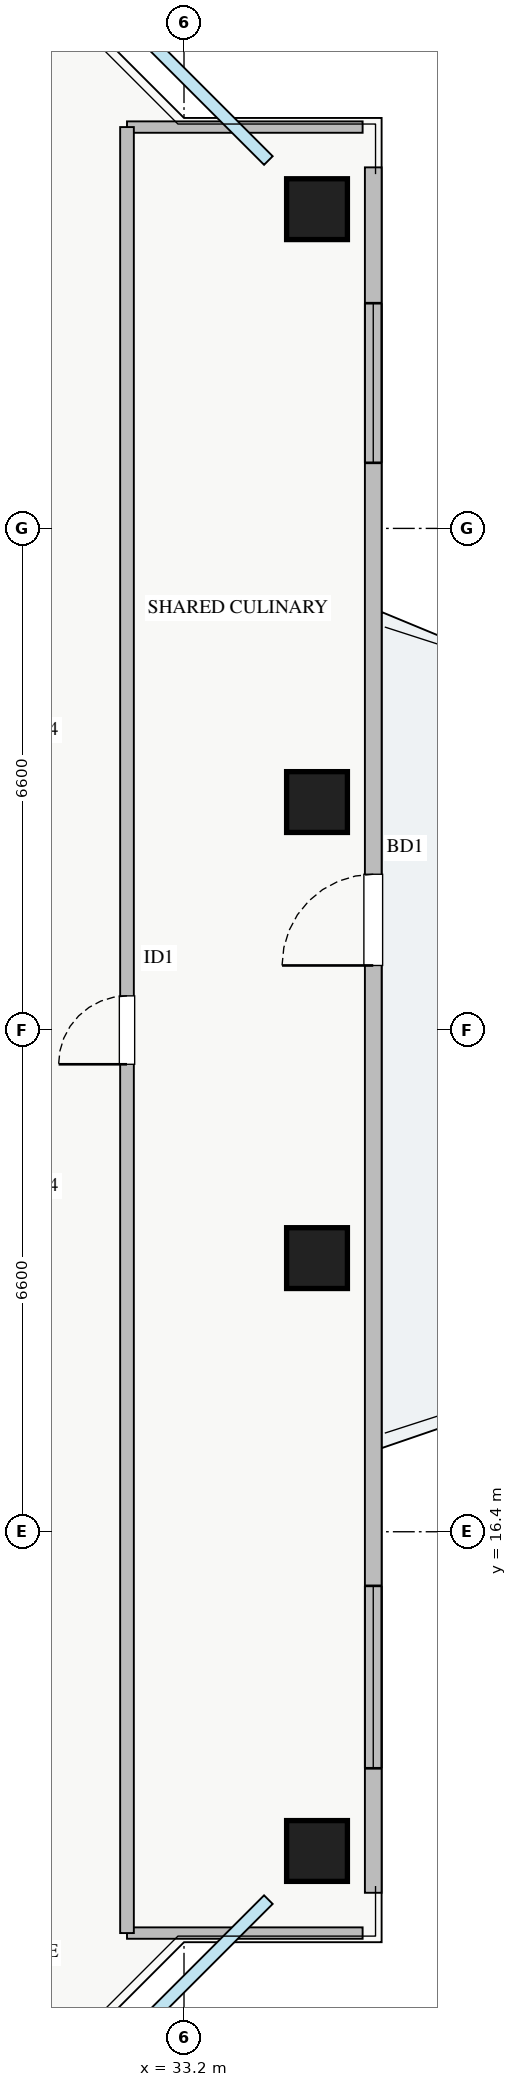
"""IFC4 building model, lengths in metres.
Left out: names, types, materials, properties, quantities, classifications, styles, units other than length and angle.
Written with IfcOpenShell. Run it as: python <this file> out.ifc"""

import sys

from ifc_helpers import new_model, si_unit, direction, frame, frame_2d, origin, origin_2d, place, context, subcontext, project, spatial, rectangle, extrude, source, transform, mapped, element, fill, save


model = new_model("IFC4")
c1 = context("Model", 3, precision=1e-05, world=origin(), true_north=direction((0.0, 1.0)))
c2 = subcontext(c1, "Body", "Model", "MODEL_VIEW")
j1 = project(units=[si_unit("LENGTHUNIT", "METRE"), si_unit("PLANEANGLEUNIT", "RADIAN")], contexts=[c1])
p1 = place(None, origin())
s1 = spatial("IfcSite", under=j1, at=p1, CompositionType="ELEMENT")
p2 = place(p1, origin())
s2 = spatial("IfcBuilding", under=s1, at=p2, CompositionType="ELEMENT")
p3 = place(p2, frame((0.0, 0.0, 226.25)))
s3 = spatial("IfcBuildingStorey", under=s2, at=p3, CompositionType="ELEMENT", Elevation=226.25)
m1 = source(origin(), c2, "Body", "SweptSolid", [
    extrude(rectangle(XDim=0.8, YDim=0.8, at=origin_2d()), origin(), (0.0, 0.0, 1.0), 3.25),
])
for number, where, z_axis, x_axis in (
    (1, (34.95, 12.2, 0.0), (0.0, 0.0, 1.0), (1.0, 0.0, 0.0)),
    (2, (34.95, 20.0, 0.0), (0.0, 0.0, 1.0), (1.0, 0.0, 0.0)),
    (3, (34.95, 26.0, 0.0), (0.0, 0.0, 1.0), (1.0, 0.0, 0.0)),
    (4, (34.95, 33.8, 0.0), (0.0, 0.0, 1.0), (1.0, 0.0, 0.0)),
):
    element("IfcColumn", number, at=place(p3, frame(where, z_axis=z_axis, x_axis=x_axis)), inside=s3, PredefinedType="COLUMN", context=c2, shape_type="MappedRepresentation", body=[
        mapped(m1, transform((0.0, 0.0, 0.0), x_axis=(1.0, 0.0, 0.0), y_axis=(0.0, 1.0, 0.0), z_axis=(0.0, 0.0, 1.0), scale=1.0)),
    ])
p4 = place(p3, frame((35.69, 11.65, 0.0), z_axis=(0.0, 0.0, 1.0), x_axis=(0.0, 1.0, 0.0)))
e5 = element("IfcWall", 5, at=p4, inside=s3, PredefinedType="STANDARD", context=c2, shape_type="SweptSolid", body=[
    extrude(rectangle(XDim=22.7, YDim=0.22, at=frame_2d((11.35, 0.0))), origin(), (0.0, 0.0, 1.0), 2.61),
])
p5 = place(p4, frame((12.2, 0.0, 0.0)))
e6 = element("IfcOpeningElement", 6, at=p5, cuts=e5, PredefinedType="OPENING", context=c2, shape_type="SweptSolid", body=[
    extrude(rectangle(XDim=1.2, YDim=2.1, at=frame_2d((0.6, 1.05))), frame((0.0, 0.12, 0.0), z_axis=(0.0, -1.0, 0.0), x_axis=(1.0, 0.0, 0.0)), (0.0, 0.0, 1.0), 0.24),
])
p6 = place(p4, frame((1.638, 0.0, 0.9)))
e7 = element("IfcOpeningElement", 7, at=p6, cuts=e5, PredefinedType="OPENING", context=c2, shape_type="SweptSolid", body=[
    extrude(rectangle(XDim=2.4, YDim=1.48, at=frame_2d((1.2, 0.74))), frame((0.0, 0.12, 0.0), z_axis=(0.0, -1.0, 0.0), x_axis=(1.0, 0.0, 0.0)), (0.0, 0.0, 1.0), 0.24),
])
p7 = place(p4, frame((18.813, 0.0, 0.9)))
e8 = element("IfcOpeningElement", 8, at=p7, cuts=e5, PredefinedType="OPENING", context=c2, shape_type="SweptSolid", body=[
    extrude(rectangle(XDim=2.1, YDim=1.48, at=frame_2d((1.05, 0.74))), frame((0.0, 0.12, 0.0), z_axis=(0.0, -1.0, 0.0), x_axis=(1.0, 0.0, 0.0)), (0.0, 0.0, 1.0), 0.24),
])
for number, where, z_axis, x_axis in (
    (9, (32.45, 34.88, 0.0), (0.0, 0.0, 1.0), (1.0, 0.0, 0.0)),
    (10, (32.45, 11.12, 0.0), (0.0, 0.0, 1.0), (1.0, 0.0, 0.0)),
):
    element("IfcWall", number, at=place(p3, frame(where, z_axis=z_axis, x_axis=x_axis)), inside=s3, PredefinedType="PARTITIONING", context=c2, shape_type="SweptSolid", body=[
        extrude(rectangle(XDim=3.1, YDim=0.15, at=frame_2d((1.55, 0.0))), origin(), (0.0, 0.0, 1.0), 3.07),
    ])
p8 = place(p3, frame((32.45, 11.12, 0.0), z_axis=(0.0, 0.0, 1.0), x_axis=(0.0, 1.0, 0.0)))
e11 = element("IfcWall", 11, at=p8, inside=s3, PredefinedType="PARTITIONING", context=c2, shape_type="SweptSolid", body=[
    extrude(rectangle(XDim=23.76, YDim=0.18, at=frame_2d((11.88, 0.0))), origin(), (0.0, 0.0, 1.0), 3.07),
])
p9 = place(p8, frame((11.43, 0.0, 0.0)))
e12 = element("IfcOpeningElement", 12, at=p9, cuts=e11, PredefinedType="OPENING", context=c2, shape_type="SweptSolid", body=[
    extrude(rectangle(XDim=0.9, YDim=2.05, at=frame_2d((0.45, 1.025))), frame((0.0, 0.1, 0.0), z_axis=(0.0, -1.0, 0.0), x_axis=(1.0, 0.0, 0.0)), (0.0, 0.0, 1.0), 0.2),
])
m2 = source(origin(), c2, "Body", "SweptSolid", [
    extrude(rectangle(XDim=1.2, YDim=2.1, at=frame_2d((0.6, 1.05))), frame((0.0, 0.025, 0.0), z_axis=(0.0, -1.0, 0.0), x_axis=(1.0, 0.0, 0.0)), (0.0, 0.0, 1.0), 0.05),
])
p10 = place(p5, origin())
e13 = element("IfcDoor", 13, at=p10, inside=s3, OperationType="SINGLE_SWING_LEFT", PredefinedType="DOOR", context=c2, shape_type="MappedRepresentation", body=[
    mapped(m2, transform((0.0, 0.0, 0.0), x_axis=(1.0, 0.0, 0.0), y_axis=(0.0, 1.0, 0.0), z_axis=(0.0, 0.0, 1.0), scale=1.0)),
])
fill(e6, e13)
m3 = source(origin(), c2, "Body", "SweptSolid", [
    extrude(rectangle(XDim=2.4, YDim=1.48, at=frame_2d((1.2, 0.74))), frame((0.0, 0.03, 0.0), z_axis=(0.0, -1.0, 0.0), x_axis=(1.0, 0.0, 0.0)), (0.0, 0.0, 1.0), 0.06),
])
p11 = place(p6, origin())
e14 = element("IfcWindow", 14, at=p11, inside=s3, PartitioningType="TRIPLE_PANEL_VERTICAL", PredefinedType="WINDOW", context=c2, shape_type="MappedRepresentation", body=[
    mapped(m3, transform((0.0, 0.0, 0.0), x_axis=(1.0, 0.0, 0.0), y_axis=(0.0, 1.0, 0.0), z_axis=(0.0, 0.0, 1.0), scale=1.0)),
])
fill(e7, e14)
m4 = source(origin(), c2, "Body", "SweptSolid", [
    extrude(rectangle(XDim=2.1, YDim=1.48, at=frame_2d((1.05, 0.74))), frame((0.0, 0.03, 0.0), z_axis=(0.0, -1.0, 0.0), x_axis=(1.0, 0.0, 0.0)), (0.0, 0.0, 1.0), 0.06),
])
p12 = place(p7, origin())
e15 = element("IfcWindow", 15, at=p12, inside=s3, PartitioningType="TRIPLE_PANEL_VERTICAL", PredefinedType="WINDOW", context=c2, shape_type="MappedRepresentation", body=[
    mapped(m4, transform((0.0, 0.0, 0.0), x_axis=(1.0, 0.0, 0.0), y_axis=(0.0, 1.0, 0.0), z_axis=(0.0, 0.0, 1.0), scale=1.0)),
])
fill(e8, e15)
m5 = source(origin(), c2, "Body", "SweptSolid", [
    extrude(rectangle(XDim=0.9, YDim=2.05, at=frame_2d((0.45, 1.025))), frame((0.0, 0.025, 0.0), z_axis=(0.0, -1.0, 0.0), x_axis=(1.0, 0.0, 0.0)), (0.0, 0.0, 1.0), 0.05),
])
p13 = place(p9, origin())
e16 = element("IfcDoor", 16, at=p13, inside=s3, OperationType="SINGLE_SWING_LEFT", PredefinedType="DOOR", context=c2, shape_type="MappedRepresentation", body=[
    mapped(m5, transform((0.0, 0.0, 0.0), x_axis=(1.0, 0.0, 0.0), y_axis=(0.0, 1.0, 0.0), z_axis=(0.0, 0.0, 1.0), scale=1.0)),
])
fill(e12, e16)
save(model, sys.argv[1])
